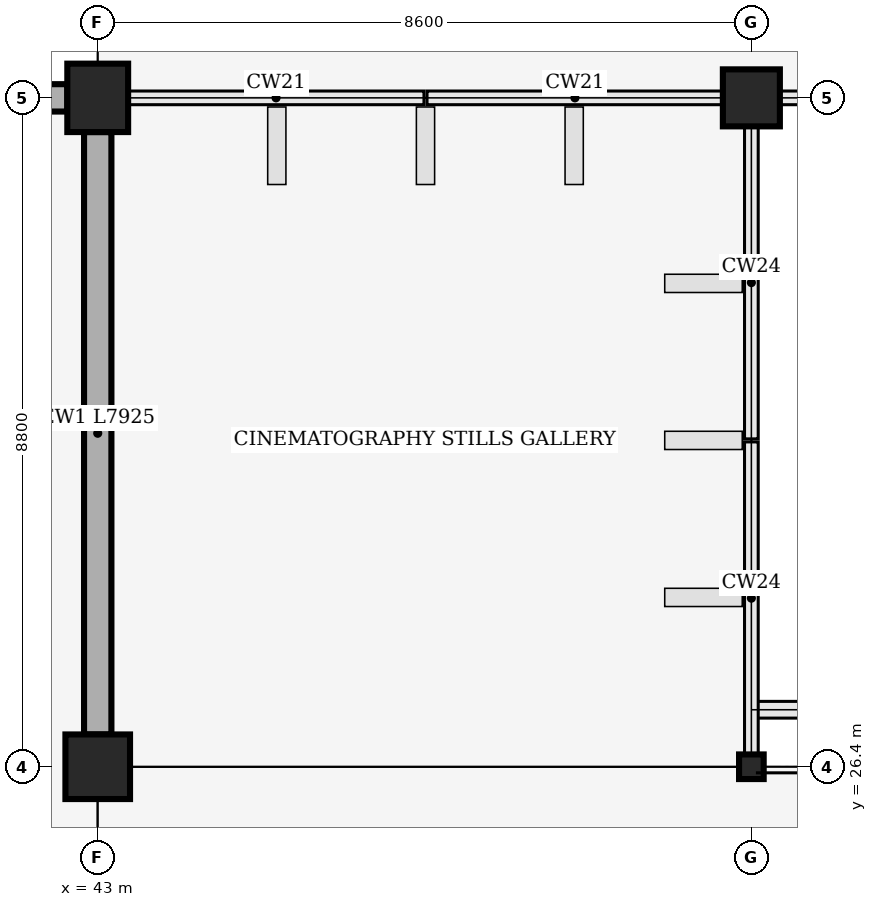
"""IFC4 building model, lengths in metres.
Left out: names, types, materials, properties, quantities, classifications, styles, units other than length and angle.
Written with IfcOpenShell. Run it as: python <this file> out.ifc"""

import sys

from ifc_helpers import new_model, si_unit, direction, frame, frame_2d, origin, origin_2d, place, context, subcontext, project, spatial, rectangle, hollow_circle, extrude, element, save


model = new_model("IFC4")
c1 = context("Model", 3, precision=1e-05, world=origin(), true_north=direction((0.0, 1.0)))
c2 = subcontext(c1, "Body", "Model", "MODEL_VIEW")
j1 = project(units=[si_unit("LENGTHUNIT", "METRE"), si_unit("PLANEANGLEUNIT", "RADIAN")], contexts=[c1])
p1 = place(None, origin())
s1 = spatial("IfcSite", under=j1, at=p1, CompositionType="ELEMENT")
p2 = place(p1, origin())
s2 = spatial("IfcBuilding", under=s1, at=p2, CompositionType="ELEMENT")
p3 = place(p2, frame((0.0, 0.0, 4.5)))
s3 = spatial("IfcBuildingStorey", under=s2, at=p3, CompositionType="ELEMENT", Elevation=4.5)
p4 = place(p3, frame((43.0, 26.4, 0.0), z_axis=(0.0, 0.0, 1.0), x_axis=(1.0, 0.0, 0.0)))
e1 = element("IfcColumn", 1, at=p4, inside=s3, PredefinedType="COLUMN", context=c2, shape_type="SweptSolid", body=[
    extrude(rectangle(XDim=0.85, YDim=0.85, at=origin_2d()), origin(), (0.0, 0.0, 1.0), 3.65),
])
p5 = place(p3, frame((43.0, 35.2, 0.0), z_axis=(0.0, 0.0, 1.0), x_axis=(1.0, 0.0, 0.0)))
e2 = element("IfcColumn", 2, at=p5, inside=s3, PredefinedType="COLUMN", context=c2, shape_type="SweptSolid", body=[
    extrude(rectangle(XDim=0.8, YDim=0.9, at=origin_2d()), origin(), (0.0, 0.0, 1.0), 3.65),
])
p6 = place(p3, frame((51.6, 26.4, 0.0), z_axis=(0.0, 0.0, 1.0), x_axis=(1.0, 0.0, 0.0)))
e3 = element("IfcColumn", 3, at=p6, inside=s3, PredefinedType="COLUMN", context=c2, shape_type="SweptSolid", body=[
    extrude(hollow_circle(Radius=0.162, WallThickness=0.01, at=origin_2d()), origin(), (0.0, 0.0, 1.0), 3.65),
])
p7 = place(p3, frame((51.6, 35.2, 0.0), z_axis=(0.0, 0.0, 1.0), x_axis=(1.0, 0.0, 0.0)))
e4 = element("IfcColumn", 4, at=p7, inside=s3, PredefinedType="COLUMN", context=c2, shape_type="SweptSolid", body=[
    extrude(rectangle(XDim=0.75, YDim=0.75, at=origin_2d()), origin(), (0.0, 0.0, 1.0), 3.65),
])
p8 = place(p3, frame((43.0, 26.825, 0.0), z_axis=(0.0, 0.0, 1.0), x_axis=(0.0, 1.0, 0.0)))
e5 = element("IfcWall", 5, at=p8, inside=s3, PredefinedType="SOLIDWALL", context=c2, shape_type="SweptSolid", body=[
    extrude(rectangle(XDim=7.925, YDim=0.36, at=frame_2d((3.962, 0.0))), origin(), (0.0, 0.0, 1.0), 2.935),
])
p9 = place(p3, frame((34.825, 35.2, 0.0), z_axis=(0.0, 0.0, 1.0), x_axis=(1.0, 0.0, 0.0)))
e6 = element("IfcWall", 6, at=p9, inside=s3, PredefinedType="SOLIDWALL", context=c2, shape_type="SweptSolid", body=[
    extrude(rectangle(XDim=7.775, YDim=0.36, at=frame_2d((3.888, 0.0))), origin(), (0.0, 0.0, 1.0), 2.935),
])
save(model, sys.argv[1])
